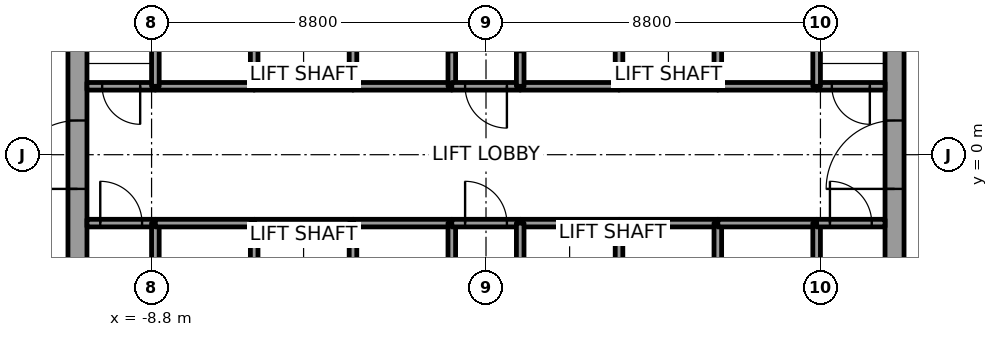
"""IFC4 building model, lengths in metres.
Left out: names, types, materials, properties, quantities, classifications, styles, units other than length and angle.
Written with IfcOpenShell. Run it as: python <this file> out.ifc"""

import sys

from ifc_helpers import new_model, si_unit, direction, frame, frame_2d, origin, place, context, subcontext, project, spatial, rectangle, extrude, element, fill, save


model = new_model("IFC4")
c1 = context("Model", 3, precision=1e-05, world=origin(), true_north=direction((0.0, 1.0)))
c2 = subcontext(c1, "Body", "Model", "MODEL_VIEW")
j1 = project(units=[si_unit("LENGTHUNIT", "METRE"), si_unit("PLANEANGLEUNIT", "RADIAN")], contexts=[c1])
p1 = place(None, origin())
s1 = spatial("IfcSite", under=j1, at=p1, CompositionType="ELEMENT")
p2 = place(p1, origin())
s2 = spatial("IfcBuilding", under=s1, at=p2, CompositionType="ELEMENT")
p3 = place(p2, frame((0.0, 0.0, 112.6)))
s3 = spatial("IfcBuildingStorey", under=s2, at=p3, CompositionType="ELEMENT", Elevation=112.6)
p4 = place(p3, frame((-10.75, -7.5, 0.0), z_axis=(0.0, 0.0, 1.0), x_axis=(0.0, 1.0, 0.0)))
e1 = element("IfcWall", 1, at=p4, inside=s3, PredefinedType="SHEAR", context=c2, shape_type="SweptSolid", body=[
    extrude(rectangle(XDim=15.0, YDim=0.5, at=frame_2d((7.5, 0.0))), origin(), (0.0, 0.0, 1.0), 6.0),
])
p5 = place(p4, frame((6.6, 0.0, 0.0)))
e2 = element("IfcOpeningElement", 2, at=p5, cuts=e1, PredefinedType="OPENING", context=c2, shape_type="SweptSolid", body=[
    extrude(rectangle(XDim=1.8, YDim=2.1, at=frame_2d((0.9, 1.05))), frame((0.0, 0.25, 0.0), z_axis=(0.0, -1.0, 0.0), x_axis=(1.0, 0.0, 0.0)), (0.0, 0.0, 1.0), 0.5),
])
p6 = place(p3, frame((10.75, -7.5, 0.0), z_axis=(0.0, 0.0, 1.0), x_axis=(0.0, 1.0, 0.0)))
e3 = element("IfcWall", 3, at=p6, inside=s3, PredefinedType="SHEAR", context=c2, shape_type="SweptSolid", body=[
    extrude(rectangle(XDim=15.0, YDim=0.5, at=frame_2d((7.5, 0.0))), origin(), (0.0, 0.0, 1.0), 6.0),
])
p7 = place(p6, frame((6.6, 0.0, 0.0)))
e4 = element("IfcOpeningElement", 4, at=p7, cuts=e3, PredefinedType="OPENING", context=c2, shape_type="SweptSolid", body=[
    extrude(rectangle(XDim=1.8, YDim=2.1, at=frame_2d((0.9, 1.05))), frame((0.0, 0.25, 0.0), z_axis=(0.0, -1.0, 0.0), x_axis=(1.0, 0.0, 0.0)), (0.0, 0.0, 1.0), 0.5),
])
p8 = place(p3, frame((-10.5, -1.8, 0.0), z_axis=(0.0, 0.0, 1.0), x_axis=(1.0, 0.0, 0.0)))
e5 = element("IfcWall", 5, at=p8, inside=s3, PredefinedType="SOLIDWALL", context=c2, shape_type="SweptSolid", body=[
    extrude(rectangle(XDim=1.8, YDim=0.2, at=frame_2d((0.9, 0.0))), origin(), (0.0, 0.0, 1.0), 5.85),
])
p9 = place(p8, frame((0.35, 0.0, 0.0)))
e6 = element("IfcOpeningElement", 6, at=p9, cuts=e5, PredefinedType="OPENING", context=c2, shape_type="SweptSolid", body=[
    extrude(rectangle(XDim=1.1, YDim=2.1, at=frame_2d((0.55, 1.05))), frame((0.0, 0.1, 0.0), z_axis=(0.0, -1.0, 0.0), x_axis=(1.0, 0.0, 0.0)), (0.0, 0.0, 1.0), 0.2),
])
p10 = place(p3, frame((-8.7, 1.8, 0.0), z_axis=(0.0, 0.0, 1.0), x_axis=(-1.0, 0.0, 0.0)))
e7 = element("IfcWall", 7, at=p10, inside=s3, PredefinedType="SOLIDWALL", context=c2, shape_type="SweptSolid", body=[
    extrude(rectangle(XDim=1.8, YDim=0.2, at=frame_2d((0.9, 0.0))), origin(), (0.0, 0.0, 1.0), 5.85),
])
p11 = place(p10, frame((0.4, 0.0, 0.0)))
e8 = element("IfcOpeningElement", 8, at=p11, cuts=e7, PredefinedType="OPENING", context=c2, shape_type="SweptSolid", body=[
    extrude(rectangle(XDim=1.0, YDim=2.1, at=frame_2d((0.5, 1.05))), frame((0.0, 0.1, 0.0), z_axis=(0.0, -1.0, 0.0), x_axis=(1.0, 0.0, 0.0)), (0.0, 0.0, 1.0), 0.2),
])
p12 = place(p3, frame((-8.7, -4.6, 0.0), z_axis=(0.0, 0.0, 1.0), x_axis=(0.0, 1.0, 0.0)))
e9 = element("IfcWall", 9, at=p12, inside=s3, PredefinedType="SOLIDWALL", context=c2, shape_type="SweptSolid", body=[
    extrude(rectangle(XDim=2.8, YDim=0.2, at=frame_2d((1.4, 0.0))), origin(), (0.0, 0.0, 1.0), 5.85),
])
for number, where, z_axis, x_axis in (
    (10, (-8.7, -1.8, 0.0), (0.0, 0.0, 1.0), (1.0, 0.0, 0.0)),
    (11, (-6.1, 1.8, 0.0), (0.0, 0.0, 1.0), (-1.0, 0.0, 0.0)),
):
    element("IfcWall", number, at=place(p3, frame(where, z_axis=z_axis, x_axis=x_axis)), inside=s3, PredefinedType="SOLIDWALL", context=c2, shape_type="SweptSolid", body=[
        extrude(rectangle(XDim=2.6, YDim=0.2, at=frame_2d((1.3, 0.0))), origin(), (0.0, 0.0, 1.0), 5.85),
    ])
for number, where, z_axis, x_axis in (
    (12, (-8.7, 1.8, 0.0), (0.0, 0.0, 1.0), (0.0, 1.0, 0.0)),
    (13, (-6.1, -4.6, 0.0), (0.0, 0.0, 1.0), (0.0, 1.0, 0.0)),
):
    element("IfcWall", number, at=place(p3, frame(where, z_axis=z_axis, x_axis=x_axis)), inside=s3, PredefinedType="SOLIDWALL", context=c2, shape_type="SweptSolid", body=[
        extrude(rectangle(XDim=2.8, YDim=0.2, at=frame_2d((1.4, 0.0))), origin(), (0.0, 0.0, 1.0), 5.85),
    ])
for number, where, z_axis, x_axis in (
    (14, (-6.1, -1.8, 0.0), (0.0, 0.0, 1.0), (1.0, 0.0, 0.0)),
    (15, (-3.5, 1.8, 0.0), (0.0, 0.0, 1.0), (-1.0, 0.0, 0.0)),
):
    element("IfcWall", number, at=place(p3, frame(where, z_axis=z_axis, x_axis=x_axis)), inside=s3, PredefinedType="SOLIDWALL", context=c2, shape_type="SweptSolid", body=[
        extrude(rectangle(XDim=2.6, YDim=0.2, at=frame_2d((1.3, 0.0))), origin(), (0.0, 0.0, 1.0), 5.85),
    ])
for number, where, z_axis, x_axis in (
    (16, (-6.1, 1.8, 0.0), (0.0, 0.0, 1.0), (0.0, 1.0, 0.0)),
    (17, (-3.5, -4.6, 0.0), (0.0, 0.0, 1.0), (0.0, 1.0, 0.0)),
):
    element("IfcWall", number, at=place(p3, frame(where, z_axis=z_axis, x_axis=x_axis)), inside=s3, PredefinedType="SOLIDWALL", context=c2, shape_type="SweptSolid", body=[
        extrude(rectangle(XDim=2.8, YDim=0.2, at=frame_2d((1.4, 0.0))), origin(), (0.0, 0.0, 1.0), 5.85),
    ])
for number, where, z_axis, x_axis in (
    (18, (-3.5, -1.8, 0.0), (0.0, 0.0, 1.0), (1.0, 0.0, 0.0)),
    (19, (-0.9, 1.8, 0.0), (0.0, 0.0, 1.0), (-1.0, 0.0, 0.0)),
):
    element("IfcWall", number, at=place(p3, frame(where, z_axis=z_axis, x_axis=x_axis)), inside=s3, PredefinedType="SOLIDWALL", context=c2, shape_type="SweptSolid", body=[
        extrude(rectangle(XDim=2.6, YDim=0.2, at=frame_2d((1.3, 0.0))), origin(), (0.0, 0.0, 1.0), 5.85),
    ])
p13 = place(p3, frame((-3.5, 4.6, 0.0), z_axis=(0.0, 0.0, 1.0), x_axis=(0.0, -1.0, 0.0)))
e20 = element("IfcWall", 20, at=p13, inside=s3, PredefinedType="SOLIDWALL", context=c2, shape_type="SweptSolid", body=[
    extrude(rectangle(XDim=2.8, YDim=0.2, at=frame_2d((1.4, 0.0))), origin(), (0.0, 0.0, 1.0), 5.85),
])
p14 = place(p3, frame((-0.9, 1.8, 0.0), z_axis=(0.0, 0.0, 1.0), x_axis=(0.0, 1.0, 0.0)))
e21 = element("IfcWall", 21, at=p14, inside=s3, PredefinedType="SOLIDWALL", context=c2, shape_type="SweptSolid", body=[
    extrude(rectangle(XDim=3.0, YDim=0.2, at=frame_2d((1.5, 0.0))), origin(), (0.0, 0.0, 1.0), 5.85),
])
p15 = place(p14, frame((0.9, 0.0, 0.0)))
e22 = element("IfcOpeningElement", 22, at=p15, cuts=e21, PredefinedType="OPENING", context=c2, shape_type="SweptSolid", body=[
    extrude(rectangle(XDim=1.2, YDim=2.1, at=frame_2d((0.6, 1.05))), frame((0.0, 0.1, 0.0), z_axis=(0.0, -1.0, 0.0), x_axis=(1.0, 0.0, 0.0)), (0.0, 0.0, 1.0), 0.2),
])
p16 = place(p3, frame((-0.9, -4.6, 0.0), z_axis=(0.0, 0.0, 1.0), x_axis=(0.0, 1.0, 0.0)))
e23 = element("IfcWall", 23, at=p16, inside=s3, PredefinedType="SOLIDWALL", context=c2, shape_type="SweptSolid", body=[
    extrude(rectangle(XDim=2.8, YDim=0.2, at=frame_2d((1.4, 0.0))), origin(), (0.0, 0.0, 1.0), 5.85),
])
p17 = place(p3, frame((-0.9, -1.8, 0.0), z_axis=(0.0, 0.0, 1.0), x_axis=(1.0, 0.0, 0.0)))
e24 = element("IfcWall", 24, at=p17, inside=s3, PredefinedType="SOLIDWALL", context=c2, shape_type="SweptSolid", body=[
    extrude(rectangle(XDim=1.8, YDim=0.2, at=frame_2d((0.9, 0.0))), origin(), (0.0, 0.0, 1.0), 5.85),
])
p18 = place(p17, frame((0.35, 0.0, 0.0)))
e25 = element("IfcOpeningElement", 25, at=p18, cuts=e24, PredefinedType="OPENING", context=c2, shape_type="SweptSolid", body=[
    extrude(rectangle(XDim=1.1, YDim=2.1, at=frame_2d((0.55, 1.05))), frame((0.0, 0.1, 0.0), z_axis=(0.0, -1.0, 0.0), x_axis=(1.0, 0.0, 0.0)), (0.0, 0.0, 1.0), 0.2),
])
p19 = place(p3, frame((0.9, 1.8, 0.0), z_axis=(0.0, 0.0, 1.0), x_axis=(-1.0, 0.0, 0.0)))
e26 = element("IfcWall", 26, at=p19, inside=s3, PredefinedType="SOLIDWALL", context=c2, shape_type="SweptSolid", body=[
    extrude(rectangle(XDim=1.8, YDim=0.2, at=frame_2d((0.9, 0.0))), origin(), (0.0, 0.0, 1.0), 5.85),
])
p20 = place(p19, frame((0.35, 0.0, 0.0)))
e27 = element("IfcOpeningElement", 27, at=p20, cuts=e26, PredefinedType="OPENING", context=c2, shape_type="SweptSolid", body=[
    extrude(rectangle(XDim=1.1, YDim=2.1, at=frame_2d((0.55, 1.05))), frame((0.0, 0.1, 0.0), z_axis=(0.0, -1.0, 0.0), x_axis=(1.0, 0.0, 0.0)), (0.0, 0.0, 1.0), 0.2),
])
p21 = place(p3, frame((0.9, -1.8, 0.0), z_axis=(0.0, 0.0, 1.0), x_axis=(1.0, 0.0, 0.0)))
e28 = element("IfcWall", 28, at=p21, inside=s3, PredefinedType="SOLIDWALL", context=c2, shape_type="SweptSolid", body=[
    extrude(rectangle(XDim=2.6, YDim=0.2, at=frame_2d((1.3, 0.0))), origin(), (0.0, 0.0, 1.0), 5.85),
])
p22 = place(p3, frame((0.9, -1.8, 0.0), z_axis=(0.0, 0.0, 1.0), x_axis=(0.0, -1.0, 0.0)))
e29 = element("IfcWall", 29, at=p22, inside=s3, PredefinedType="SOLIDWALL", context=c2, shape_type="SweptSolid", body=[
    extrude(rectangle(XDim=2.8, YDim=0.2, at=frame_2d((1.4, 0.0))), origin(), (0.0, 0.0, 1.0), 5.85),
])
p23 = place(p3, frame((3.5, 1.8, 0.0), z_axis=(0.0, 0.0, 1.0), x_axis=(-1.0, 0.0, 0.0)))
e30 = element("IfcWall", 30, at=p23, inside=s3, PredefinedType="SOLIDWALL", context=c2, shape_type="SweptSolid", body=[
    extrude(rectangle(XDim=2.6, YDim=0.2, at=frame_2d((1.3, 0.0))), origin(), (0.0, 0.0, 1.0), 5.85),
])
p24 = place(p3, frame((0.9, 4.8, 0.0), z_axis=(0.0, 0.0, 1.0), x_axis=(0.0, -1.0, 0.0)))
e31 = element("IfcWall", 31, at=p24, inside=s3, PredefinedType="SOLIDWALL", context=c2, shape_type="SweptSolid", body=[
    extrude(rectangle(XDim=3.0, YDim=0.2, at=frame_2d((1.5, 0.0))), origin(), (0.0, 0.0, 1.0), 5.85),
])
p25 = place(p24, frame((0.9, 0.0, 0.0)))
e32 = element("IfcOpeningElement", 32, at=p25, cuts=e31, PredefinedType="OPENING", context=c2, shape_type="SweptSolid", body=[
    extrude(rectangle(XDim=1.2, YDim=2.1, at=frame_2d((0.6, 1.05))), frame((0.0, 0.1, 0.0), z_axis=(0.0, -1.0, 0.0), x_axis=(1.0, 0.0, 0.0)), (0.0, 0.0, 1.0), 0.2),
])
p26 = place(p3, frame((3.5, -4.6, 0.0), z_axis=(0.0, 0.0, 1.0), x_axis=(0.0, 1.0, 0.0)))
e33 = element("IfcWall", 33, at=p26, inside=s3, PredefinedType="SOLIDWALL", context=c2, shape_type="SweptSolid", body=[
    extrude(rectangle(XDim=2.8, YDim=0.2, at=frame_2d((1.4, 0.0))), origin(), (0.0, 0.0, 1.0), 5.85),
])
for number, where, z_axis, x_axis in (
    (34, (3.5, -1.8, 0.0), (0.0, 0.0, 1.0), (1.0, 0.0, 0.0)),
    (35, (6.1, 1.8, 0.0), (0.0, 0.0, 1.0), (-1.0, 0.0, 0.0)),
):
    element("IfcWall", number, at=place(p3, frame(where, z_axis=z_axis, x_axis=x_axis)), inside=s3, PredefinedType="SOLIDWALL", context=c2, shape_type="SweptSolid", body=[
        extrude(rectangle(XDim=2.6, YDim=0.2, at=frame_2d((1.3, 0.0))), origin(), (0.0, 0.0, 1.0), 5.85),
    ])
for number, where, z_axis, x_axis in (
    (36, (3.5, 1.8, 0.0), (0.0, 0.0, 1.0), (0.0, 1.0, 0.0)),
    (37, (6.1, -4.6, 0.0), (0.0, 0.0, 1.0), (0.0, 1.0, 0.0)),
):
    element("IfcWall", number, at=place(p3, frame(where, z_axis=z_axis, x_axis=x_axis)), inside=s3, PredefinedType="SOLIDWALL", context=c2, shape_type="SweptSolid", body=[
        extrude(rectangle(XDim=2.8, YDim=0.2, at=frame_2d((1.4, 0.0))), origin(), (0.0, 0.0, 1.0), 5.85),
    ])
for number, where, z_axis, x_axis in (
    (38, (6.1, -1.8, 0.0), (0.0, 0.0, 1.0), (1.0, 0.0, 0.0)),
    (39, (8.7, 1.8, 0.0), (0.0, 0.0, 1.0), (-1.0, 0.0, 0.0)),
):
    element("IfcWall", number, at=place(p3, frame(where, z_axis=z_axis, x_axis=x_axis)), inside=s3, PredefinedType="SOLIDWALL", context=c2, shape_type="SweptSolid", body=[
        extrude(rectangle(XDim=2.6, YDim=0.2, at=frame_2d((1.3, 0.0))), origin(), (0.0, 0.0, 1.0), 5.85),
    ])
for number, where, z_axis, x_axis in (
    (40, (6.1, 1.8, 0.0), (0.0, 0.0, 1.0), (0.0, 1.0, 0.0)),
    (41, (8.7, -1.8, 0.0), (0.0, 0.0, 1.0), (0.0, -1.0, 0.0)),
):
    element("IfcWall", number, at=place(p3, frame(where, z_axis=z_axis, x_axis=x_axis)), inside=s3, PredefinedType="SOLIDWALL", context=c2, shape_type="SweptSolid", body=[
        extrude(rectangle(XDim=2.8, YDim=0.2, at=frame_2d((1.4, 0.0))), origin(), (0.0, 0.0, 1.0), 5.85),
    ])
p27 = place(p3, frame((8.7, -1.8, 0.0), z_axis=(0.0, 0.0, 1.0), x_axis=(1.0, 0.0, 0.0)))
e42 = element("IfcWall", 42, at=p27, inside=s3, PredefinedType="SOLIDWALL", context=c2, shape_type="SweptSolid", body=[
    extrude(rectangle(XDim=1.8, YDim=0.2, at=frame_2d((0.9, 0.0))), origin(), (0.0, 0.0, 1.0), 5.85),
])
p28 = place(p27, frame((0.35, 0.0, 0.0)))
e43 = element("IfcOpeningElement", 43, at=p28, cuts=e42, PredefinedType="OPENING", context=c2, shape_type="SweptSolid", body=[
    extrude(rectangle(XDim=1.1, YDim=2.1, at=frame_2d((0.55, 1.05))), frame((0.0, 0.1, 0.0), z_axis=(0.0, -1.0, 0.0), x_axis=(1.0, 0.0, 0.0)), (0.0, 0.0, 1.0), 0.2),
])
p29 = place(p3, frame((10.5, 1.8, 0.0), z_axis=(0.0, 0.0, 1.0), x_axis=(-1.0, 0.0, 0.0)))
e44 = element("IfcWall", 44, at=p29, inside=s3, PredefinedType="SOLIDWALL", context=c2, shape_type="SweptSolid", body=[
    extrude(rectangle(XDim=1.8, YDim=0.2, at=frame_2d((0.9, 0.0))), origin(), (0.0, 0.0, 1.0), 5.85),
])
p30 = place(p29, frame((0.4, 0.0, 0.0)))
e45 = element("IfcOpeningElement", 45, at=p30, cuts=e44, PredefinedType="OPENING", context=c2, shape_type="SweptSolid", body=[
    extrude(rectangle(XDim=1.0, YDim=2.1, at=frame_2d((0.5, 1.05))), frame((0.0, 0.1, 0.0), z_axis=(0.0, -1.0, 0.0), x_axis=(1.0, 0.0, 0.0)), (0.0, 0.0, 1.0), 0.2),
])
p31 = place(p3, frame((8.7, 4.6, 0.0), z_axis=(0.0, 0.0, 1.0), x_axis=(0.0, -1.0, 0.0)))
e46 = element("IfcWall", 46, at=p31, inside=s3, PredefinedType="SOLIDWALL", context=c2, shape_type="SweptSolid", body=[
    extrude(rectangle(XDim=2.8, YDim=0.2, at=frame_2d((1.4, 0.0))), origin(), (0.0, 0.0, 1.0), 5.85),
])
p32 = place(p9, origin())
e47 = element("IfcDoor", 47, at=p32, inside=s3, OperationType="SINGLE_SWING_RIGHT", PredefinedType="DOOR", context=c2, shape_type="SweptSolid", body=[
    extrude(rectangle(XDim=1.1, YDim=2.1, at=frame_2d((0.55, 1.05))), frame((0.0, 0.025, 0.0), z_axis=(0.0, -1.0, 0.0), x_axis=(1.0, 0.0, 0.0)), (0.0, 0.0, 1.0), 0.05),
])
fill(e6, e47)
p33 = place(p28, origin())
e48 = element("IfcDoor", 48, at=p33, inside=s3, OperationType="SINGLE_SWING_LEFT", PredefinedType="DOOR", context=c2, shape_type="SweptSolid", body=[
    extrude(rectangle(XDim=1.1, YDim=2.1, at=frame_2d((0.55, 1.05))), frame((0.0, 0.025, 0.0), z_axis=(0.0, -1.0, 0.0), x_axis=(1.0, 0.0, 0.0)), (0.0, 0.0, 1.0), 0.05),
])
fill(e43, e48)
p34 = place(p20, origin())
e49 = element("IfcDoor", 49, at=p34, inside=s3, OperationType="SINGLE_SWING_RIGHT", PredefinedType="DOOR", context=c2, shape_type="SweptSolid", body=[
    extrude(rectangle(XDim=1.1, YDim=2.1, at=frame_2d((0.55, 1.05))), frame((0.0, 0.025, 0.0), z_axis=(0.0, -1.0, 0.0), x_axis=(1.0, 0.0, 0.0)), (0.0, 0.0, 1.0), 0.05),
])
fill(e27, e49)
p35 = place(p18, origin())
e50 = element("IfcDoor", 50, at=p35, inside=s3, OperationType="SINGLE_SWING_LEFT", PredefinedType="DOOR", context=c2, shape_type="SweptSolid", body=[
    extrude(rectangle(XDim=1.1, YDim=2.1, at=frame_2d((0.55, 1.05))), frame((0.0, 0.025, 0.0), z_axis=(0.0, -1.0, 0.0), x_axis=(1.0, 0.0, 0.0)), (0.0, 0.0, 1.0), 0.05),
])
fill(e25, e50)
p36 = place(p11, origin())
e51 = element("IfcDoor", 51, at=p36, inside=s3, OperationType="SINGLE_SWING_RIGHT", PredefinedType="DOOR", context=c2, shape_type="SweptSolid", body=[
    extrude(rectangle(XDim=1.0, YDim=2.1, at=frame_2d((0.5, 1.05))), frame((0.0, 0.025, 0.0), z_axis=(0.0, -1.0, 0.0), x_axis=(1.0, 0.0, 0.0)), (0.0, 0.0, 1.0), 0.05),
])
fill(e8, e51)
p37 = place(p30, origin())
e52 = element("IfcDoor", 52, at=p37, inside=s3, OperationType="SINGLE_SWING_RIGHT", PredefinedType="DOOR", context=c2, shape_type="SweptSolid", body=[
    extrude(rectangle(XDim=1.0, YDim=2.1, at=frame_2d((0.5, 1.05))), frame((0.0, 0.025, 0.0), z_axis=(0.0, -1.0, 0.0), x_axis=(1.0, 0.0, 0.0)), (0.0, 0.0, 1.0), 0.05),
])
fill(e45, e52)
p38 = place(p5, origin())
e53 = element("IfcDoor", 53, at=p38, inside=s3, OperationType="DOUBLE_DOOR_SINGLE_SWING", PredefinedType="DOOR", context=c2, shape_type="SweptSolid", body=[
    extrude(rectangle(XDim=1.8, YDim=2.1, at=frame_2d((0.9, 1.05))), frame((0.0, 0.025, 0.0), z_axis=(0.0, -1.0, 0.0), x_axis=(1.0, 0.0, 0.0)), (0.0, 0.0, 1.0), 0.05),
])
fill(e2, e53)
p39 = place(p7, origin())
e54 = element("IfcDoor", 54, at=p39, inside=s3, OperationType="DOUBLE_DOOR_SINGLE_SWING", PredefinedType="DOOR", context=c2, shape_type="SweptSolid", body=[
    extrude(rectangle(XDim=1.8, YDim=2.1, at=frame_2d((0.9, 1.05))), frame((0.0, 0.025, 0.0), z_axis=(0.0, -1.0, 0.0), x_axis=(1.0, 0.0, 0.0)), (0.0, 0.0, 1.0), 0.05),
])
fill(e4, e54)
save(model, sys.argv[1])
